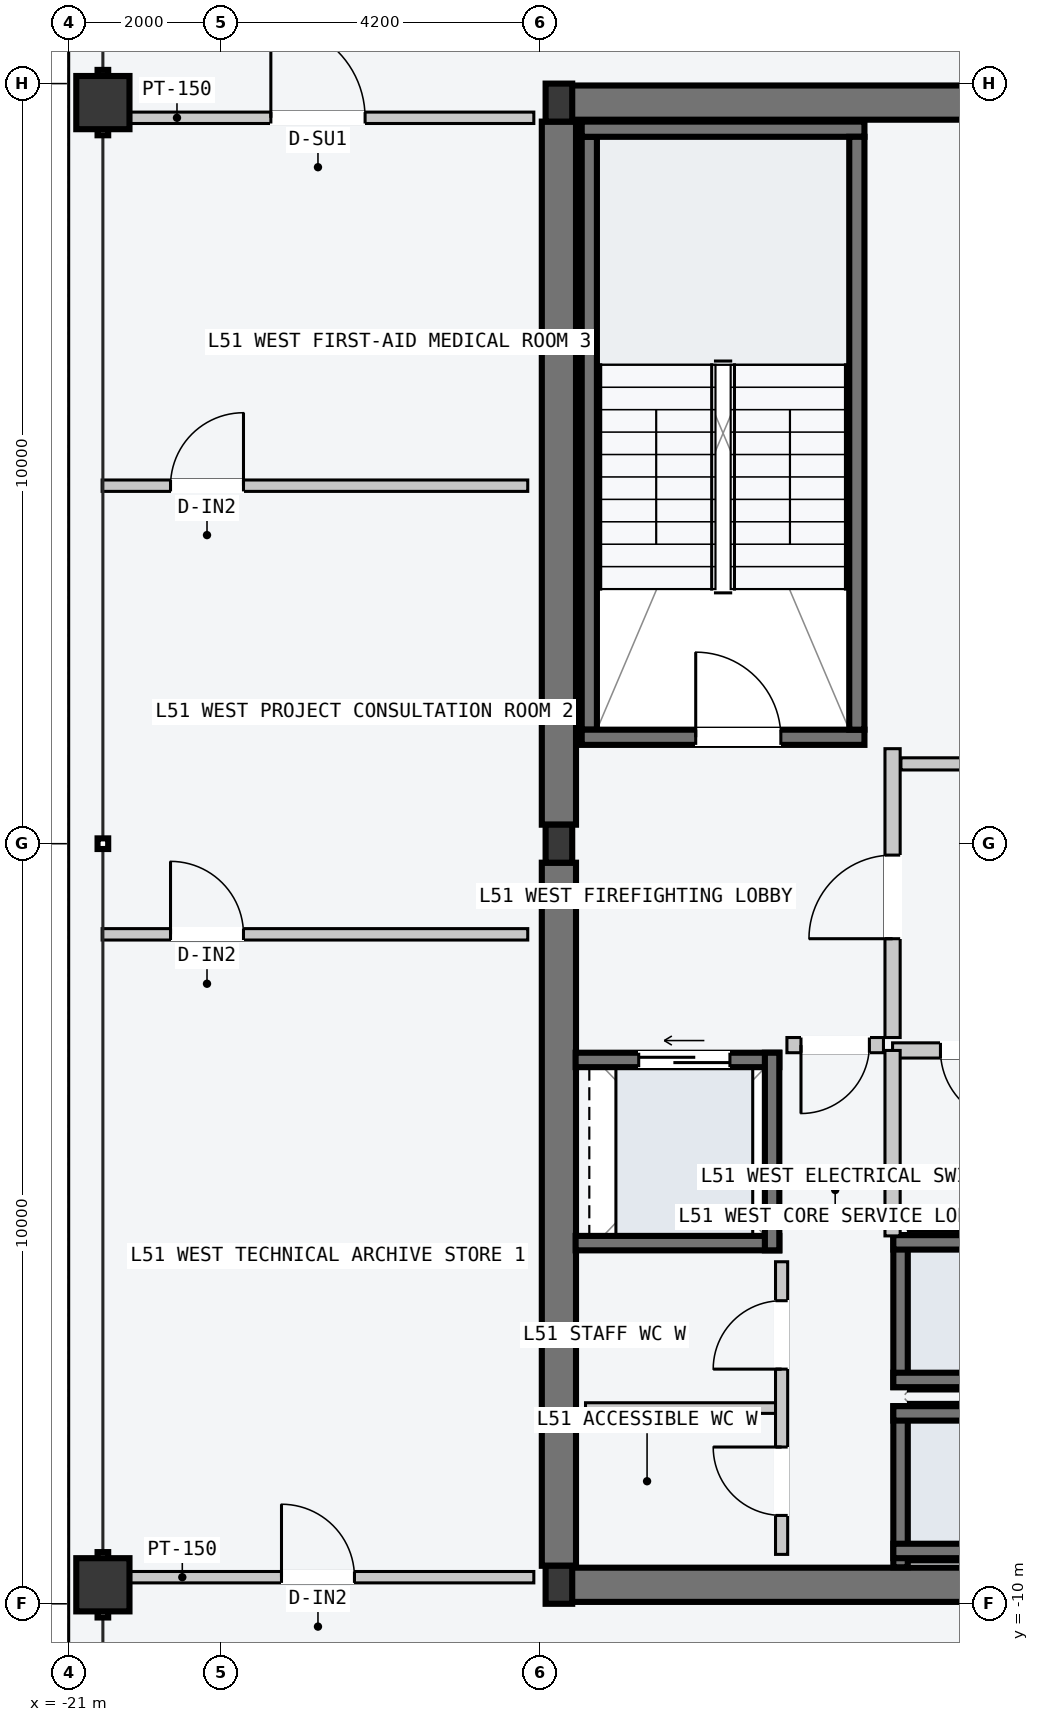
"""IFC4 building model, lengths in metres.
Left out: names, types, materials, properties, quantities, classifications, styles, units other than length and angle.
Written with IfcOpenShell. Run it as: python <this file> out.ifc"""

import sys

from ifc_helpers import new_model, si_unit, direction, frame, frame_2d, origin, origin_2d, place, context, subcontext, project, spatial, rectangle, hollow_rectangle, i_section, extrude, element, fill, save


model = new_model("IFC4")
c1 = context("Model", 3, precision=1e-05, world=origin(), true_north=direction((0.0, 1.0)))
c2 = subcontext(c1, "Body", "Model", "MODEL_VIEW")
j1 = project(units=[si_unit("LENGTHUNIT", "METRE"), si_unit("PLANEANGLEUNIT", "RADIAN")], contexts=[c1])
p1 = place(None, origin())
s1 = spatial("IfcSite", under=j1, at=p1, CompositionType="ELEMENT")
p2 = place(p1, origin())
s2 = spatial("IfcBuilding", under=s1, at=p2, CompositionType="ELEMENT")
p3 = place(p2, frame((0.0, 0.0, 194.7)))
s3 = spatial("IfcBuildingStorey", under=s2, at=p3, CompositionType="ELEMENT", Elevation=194.7)
for number, where, z_axis, x_axis in (
    (1, (-14.53, -9.75, -0.2), (0.0, 0.0, 1.0), (1.0, 0.0, 0.0)),
    (2, (-14.53, 9.75, -0.2), (0.0, 0.0, 1.0), (1.0, 0.0, 0.0)),
):
    element("IfcWall", number, at=place(p3, frame(where, z_axis=z_axis, x_axis=x_axis)), inside=s3, PredefinedType="SHEAR", context=c2, shape_type="SweptSolid", body=[
        extrude(rectangle(XDim=6.46, YDim=0.45, at=frame_2d((3.23, 0.0))), origin(), (0.0, 0.0, 1.0), 3.6),
    ])
for number, where, z_axis, x_axis in (
    (3, (-14.55, -9.5, -0.2), (0.0, 0.0, 1.0), (0.0, 1.0, 0.0)),
    (4, (-14.55, 0.25, -0.2), (0.0, 0.0, 1.0), (0.0, 1.0, 0.0)),
):
    element("IfcWall", number, at=place(p3, frame(where, z_axis=z_axis, x_axis=x_axis)), inside=s3, PredefinedType="SHEAR", context=c2, shape_type="SweptSolid", body=[
        extrude(rectangle(XDim=9.25, YDim=0.45, at=frame_2d((4.625, 0.0))), origin(), (0.0, 0.0, 1.0), 3.6),
    ])
p4 = place(p3, frame((-14.15, 1.5, -0.2), z_axis=(0.0, 0.0, 1.0), x_axis=(0.0, 1.0, 0.0)))
e5 = element("IfcWall", 5, at=p4, inside=s3, PredefinedType="SOLIDWALL", context=c2, shape_type="SweptSolid", body=[
    extrude(rectangle(XDim=7.8, YDim=0.2, at=frame_2d((3.9, 0.0))), origin(), (0.0, 0.0, 1.0), 3.6),
])
p5 = place(p3, frame((-14.25, 1.4, -0.2), z_axis=(0.0, 0.0, 1.0), x_axis=(1.0, 0.0, 0.0)))
e6 = element("IfcWall", 6, at=p5, inside=s3, PredefinedType="SOLIDWALL", context=c2, shape_type="SweptSolid", body=[
    extrude(rectangle(XDim=3.72, YDim=0.2, at=frame_2d((1.86, 0.0))), origin(), (0.0, 0.0, 1.0), 3.6),
])
p6 = place(p5, frame((1.5, 0.0, 0.2)))
e7 = element("IfcOpeningElement", 7, at=p6, cuts=e6, PredefinedType="OPENING", context=c2, shape_type="SweptSolid", body=[
    extrude(rectangle(XDim=1.12, YDim=2.18, at=frame_2d((0.56, 1.09))), frame((0.0, 0.11, 0.0), z_axis=(0.0, -1.0, 0.0), x_axis=(1.0, 0.0, 0.0)), (0.0, 0.0, 1.0), 0.22),
])
p7 = place(p3, frame((-14.25, 9.4, -0.2), z_axis=(0.0, 0.0, 1.0), x_axis=(1.0, 0.0, 0.0)))
e8 = element("IfcWall", 8, at=p7, inside=s3, PredefinedType="SOLIDWALL", context=c2, shape_type="SweptSolid", body=[
    extrude(rectangle(XDim=3.72, YDim=0.2, at=frame_2d((1.86, 0.0))), origin(), (0.0, 0.0, 1.0), 3.6),
])
p8 = place(p3, frame((-10.63, 1.5, -0.2), z_axis=(0.0, 0.0, 1.0), x_axis=(0.0, 1.0, 0.0)))
e9 = element("IfcWall", 9, at=p8, inside=s3, PredefinedType="SOLIDWALL", context=c2, shape_type="SweptSolid", body=[
    extrude(rectangle(XDim=7.8, YDim=0.2, at=frame_2d((3.9, 0.0))), origin(), (0.0, 0.0, 1.0), 3.6),
])
for number, where, z_axis, x_axis in (
    (10, (-14.55, -9.75, 0.0), (0.0, 0.0, 1.0), (1.0, 0.0, 0.0)),
    (11, (-14.55, 0.0, 0.0), (0.0, 0.0, 1.0), (1.0, 0.0, 0.0)),
    (12, (-14.55, 9.75, 0.0), (0.0, 0.0, 1.0), (1.0, 0.0, 0.0)),
):
    element("IfcColumn", number, at=place(p3, frame(where, z_axis=z_axis, x_axis=x_axis)), inside=s3, PredefinedType="COLUMN", context=c2, shape_type="SweptSolid", body=[
        extrude(i_section(OverallWidth=0.35, OverallDepth=0.5, WebThickness=0.02, FlangeThickness=0.032, at=origin_2d()), origin(), (0.0, 0.0, 1.0), 3.6),
    ])
for number, where, z_axis, x_axis in (
    (13, (-20.55, -9.75, 0.0), (0.0, 0.0, 1.0), (0.0, 1.0, 0.0)),
    (14, (-20.55, 9.75, 0.0), (0.0, 0.0, 1.0), (0.0, 1.0, 0.0)),
):
    element("IfcColumn", number, at=place(p3, frame(where, z_axis=z_axis, x_axis=x_axis)), inside=s3, PredefinedType="COLUMN", context=c2, shape_type="SweptSolid", body=[
        extrude(hollow_rectangle(XDim=0.7, YDim=0.7, WallThickness=0.03, at=origin_2d()), origin(), (0.0, 0.0, 1.0), 3.6),
    ])
p9 = place(p3, frame((-10.055, -9.52, -0.2), z_axis=(0.0, 0.0, 1.0), x_axis=(0.0, 1.0, 0.0)))
e15 = element("IfcWall", 15, at=p9, inside=s3, PredefinedType="SOLIDWALL", context=c2, shape_type="SweptSolid", body=[
    extrude(rectangle(XDim=2.12, YDim=0.19, at=frame_2d((1.06, 0.0))), origin(), (0.0, 0.0, 1.0), 3.6),
])
for number, where, z_axis, x_axis in (
    (16, (-10.15, -7.495, -0.2), (0.0, 0.0, 1.0), (1.0, 0.0, 0.0)),
    (17, (-10.15, -9.305, -0.2), (0.0, 0.0, 1.0), (1.0, 0.0, 0.0)),
):
    element("IfcWall", number, at=place(p3, frame(where, z_axis=z_axis, x_axis=x_axis)), inside=s3, PredefinedType="SOLIDWALL", context=c2, shape_type="SweptSolid", body=[
        extrude(rectangle(XDim=2.2, YDim=0.19, at=frame_2d((1.1, 0.0))), origin(), (0.0, 0.0, 1.0), 3.6),
    ])
p10 = place(p3, frame((-10.055, -7.15, -0.2), z_axis=(0.0, 0.0, 1.0), x_axis=(0.0, 1.0, 0.0)))
e18 = element("IfcWall", 18, at=p10, inside=s3, PredefinedType="SOLIDWALL", context=c2, shape_type="SweptSolid", body=[
    extrude(rectangle(XDim=2.0, YDim=0.19, at=frame_2d((1.0, 0.0))), origin(), (0.0, 0.0, 1.0), 3.6),
])
for number, where, z_axis, x_axis in (
    (19, (-10.15, -5.245, -0.2), (0.0, 0.0, 1.0), (1.0, 0.0, 0.0)),
    (20, (-10.15, -7.055, -0.2), (0.0, 0.0, 1.0), (1.0, 0.0, 0.0)),
):
    element("IfcWall", number, at=place(p3, frame(where, z_axis=z_axis, x_axis=x_axis)), inside=s3, PredefinedType="SOLIDWALL", context=c2, shape_type="SweptSolid", body=[
        extrude(rectangle(XDim=2.2, YDim=0.19, at=frame_2d((1.1, 0.0))), origin(), (0.0, 0.0, 1.0), 3.6),
    ])
p11 = place(p3, frame((-14.33, -2.845, -0.2), z_axis=(0.0, 0.0, 1.0), x_axis=(1.0, 0.0, 0.0)))
e21 = element("IfcWall", 21, at=p11, inside=s3, PredefinedType="SOLIDWALL", context=c2, shape_type="SweptSolid", body=[
    extrude(rectangle(XDim=2.68, YDim=0.19, at=frame_2d((1.34, 0.0))), origin(), (0.0, 0.0, 1.0), 3.6),
])
p12 = place(p11, frame((0.83, 0.0, 0.2)))
e22 = element("IfcOpeningElement", 22, at=p12, cuts=e21, PredefinedType="OPENING", context=c2, shape_type="SweptSolid", body=[
    extrude(rectangle(XDim=1.2, YDim=2.2, at=frame_2d((0.6, 1.1))), frame((0.0, 0.105, 0.0), z_axis=(0.0, -1.0, 0.0), x_axis=(1.0, 0.0, 0.0)), (0.0, 0.0, 1.0), 0.21),
])
p13 = place(p3, frame((-14.33, -5.255, -0.2), z_axis=(0.0, 0.0, 1.0), x_axis=(1.0, 0.0, 0.0)))
e23 = element("IfcWall", 23, at=p13, inside=s3, PredefinedType="SOLIDWALL", context=c2, shape_type="SweptSolid", body=[
    extrude(rectangle(XDim=2.68, YDim=0.19, at=frame_2d((1.34, 0.0))), origin(), (0.0, 0.0, 1.0), 3.6),
])
p14 = place(p3, frame((-11.745, -5.35, -0.2), z_axis=(0.0, 0.0, 1.0), x_axis=(0.0, 1.0, 0.0)))
e24 = element("IfcWall", 24, at=p14, inside=s3, PredefinedType="SOLIDWALL", context=c2, shape_type="SweptSolid", body=[
    extrude(rectangle(XDim=2.6, YDim=0.19, at=frame_2d((1.3, 0.0))), origin(), (0.0, 0.0, 1.0), 3.6),
])
p15 = place(p3, frame((-10.16, -2.55, 0.0), z_axis=(0.0, 0.0, 1.0), x_axis=(0.0, 1.0, 0.0)))
e25 = element("IfcWall", 25, at=p15, inside=s3, PredefinedType="PARTITIONING", context=c2, shape_type="SweptSolid", body=[
    extrude(rectangle(XDim=3.8, YDim=0.2, at=frame_2d((1.9, 0.0))), origin(), (0.0, 0.0, 1.0), 3.4),
])
p16 = place(p15, frame((1.3, 0.0, 0.0)))
e26 = element("IfcOpeningElement", 26, at=p16, cuts=e25, PredefinedType="OPENING", context=c2, shape_type="SweptSolid", body=[
    extrude(rectangle(XDim=1.1, YDim=2.15, at=frame_2d((0.55, 1.075))), frame((0.0, 0.11, 0.0), z_axis=(0.0, -1.0, 0.0), x_axis=(1.0, 0.0, 0.0)), (0.0, 0.0, 1.0), 0.22),
])
p17 = place(p3, frame((-10.28, -2.65, 0.0), z_axis=(0.0, 0.0, 1.0), x_axis=(-1.0, 0.0, 0.0)))
e27 = element("IfcWall", 27, at=p17, inside=s3, PredefinedType="PARTITIONING", context=c2, shape_type="SweptSolid", body=[
    extrude(rectangle(XDim=1.27, YDim=0.2, at=frame_2d((0.635, 0.0))), origin(), (0.0, 0.0, 1.0), 3.4),
])
p18 = place(p17, frame((0.185, 0.0, 0.0)))
e28 = element("IfcOpeningElement", 28, at=p18, cuts=e27, PredefinedType="OPENING", context=c2, shape_type="SweptSolid", body=[
    extrude(rectangle(XDim=0.9, YDim=2.15, at=frame_2d((0.45, 1.075))), frame((0.0, 0.11, 0.0), z_axis=(0.0, -1.0, 0.0), x_axis=(1.0, 0.0, 0.0)), (0.0, 0.0, 1.0), 0.22),
])
p19 = place(p3, frame((-7.96, -2.72, 0.0), z_axis=(0.0, 0.0, 1.0), x_axis=(-1.0, 0.0, 0.0)))
e29 = element("IfcWall", 29, at=p19, inside=s3, PredefinedType="PARTITIONING", context=c2, shape_type="SweptSolid", body=[
    extrude(rectangle(XDim=2.2, YDim=0.2, at=frame_2d((1.1, 0.0))), origin(), (0.0, 0.0, 1.0), 3.4),
])
p20 = place(p19, frame((0.62, 0.0, 0.0)))
e30 = element("IfcOpeningElement", 30, at=p20, cuts=e29, PredefinedType="OPENING", context=c2, shape_type="SweptSolid", body=[
    extrude(rectangle(XDim=0.95, YDim=2.1, at=frame_2d((0.475, 1.05))), frame((0.0, 0.11, 0.0), z_axis=(0.0, -1.0, 0.0), x_axis=(1.0, 0.0, 0.0)), (0.0, 0.0, 1.0), 0.22),
])
p21 = place(p3, frame((-10.16, -5.16, 0.0), z_axis=(0.0, 0.0, 1.0), x_axis=(0.0, 1.0, 0.0)))
e31 = element("IfcWall", 31, at=p21, inside=s3, PredefinedType="PARTITIONING", context=c2, shape_type="SweptSolid", body=[
    extrude(rectangle(XDim=2.44, YDim=0.2, at=frame_2d((1.22, 0.0))), origin(), (0.0, 0.0, 1.0), 3.4),
])
p22 = place(p3, frame((-11.7, -7.425, 0.0), z_axis=(0.0, 0.0, 1.0), x_axis=(-1.0, 0.0, 0.0)))
e32 = element("IfcWall", 32, at=p22, inside=s3, PredefinedType="PARTITIONING", context=c2, shape_type="SweptSolid", body=[
    extrude(rectangle(XDim=2.5, YDim=0.14, at=frame_2d((1.25, 0.0))), origin(), (0.0, 0.0, 1.0), 3.4),
])
p23 = place(p3, frame((-11.62, -9.35, 0.0), z_axis=(0.0, 0.0, 1.0), x_axis=(0.0, 1.0, 0.0)))
e33 = element("IfcWall", 33, at=p23, inside=s3, PredefinedType="PARTITIONING", context=c2, shape_type="SweptSolid", body=[
    extrude(rectangle(XDim=3.85, YDim=0.16, at=frame_2d((1.925, 0.0))), origin(), (0.0, 0.0, 1.0), 3.4),
])
p24 = place(p23, frame((0.512, 0.0, 0.0)))
e34 = element("IfcOpeningElement", 34, at=p24, cuts=e33, PredefinedType="OPENING", context=c2, shape_type="SweptSolid", body=[
    extrude(rectangle(XDim=0.9, YDim=2.15, at=frame_2d((0.45, 1.075))), frame((0.0, 0.09, 0.0), z_axis=(0.0, -1.0, 0.0), x_axis=(1.0, 0.0, 0.0)), (0.0, 0.0, 1.0), 0.18),
])
p25 = place(p23, frame((2.438, 0.0, 0.0)))
e35 = element("IfcOpeningElement", 35, at=p25, cuts=e33, PredefinedType="OPENING", context=c2, shape_type="SweptSolid", body=[
    extrude(rectangle(XDim=0.9, YDim=2.15, at=frame_2d((0.45, 1.075))), frame((0.0, 0.09, 0.0), z_axis=(0.0, -1.0, 0.0), x_axis=(1.0, 0.0, 0.0)), (0.0, 0.0, 1.0), 0.18),
])
p26 = place(p3, frame((-10.05, 1.05, 0.0), z_axis=(0.0, 0.0, 1.0), x_axis=(1.0, 0.0, 0.0)))
e36 = element("IfcWall", 36, at=p26, inside=s3, PredefinedType="PARTITIONING", context=c2, shape_type="SweptSolid", body=[
    extrude(rectangle(XDim=8.79, YDim=0.16, at=frame_2d((4.395, 0.0))), origin(), (0.0, 0.0, 1.0), 3.4),
])
p27 = place(p3, frame((-20.56, 9.55, 0.0), z_axis=(0.0, 0.0, 1.0), x_axis=(1.0, 0.0, 0.0)))
e37 = element("IfcWall", 37, at=p27, inside=s3, PredefinedType="PARTITIONING", context=c2, shape_type="SweptSolid", body=[
    extrude(rectangle(XDim=5.68, YDim=0.15, at=frame_2d((2.84, 0.0))), origin(), (0.0, 0.0, 1.0), 3.4),
])
p28 = place(p27, frame((2.22, 0.0, 0.0)))
e38 = element("IfcOpeningElement", 38, at=p28, cuts=e37, PredefinedType="OPENING", context=c2, shape_type="SweptSolid", body=[
    extrude(rectangle(XDim=1.24, YDim=2.24, at=frame_2d((0.62, 1.12))), frame((0.0, 0.085, 0.0), z_axis=(0.0, -1.0, 0.0), x_axis=(1.0, 0.0, 0.0)), (0.0, 0.0, 1.0), 0.17),
])
p29 = place(p3, frame((-20.56, -9.65, 0.0), z_axis=(0.0, 0.0, 1.0), x_axis=(1.0, 0.0, 0.0)))
e39 = element("IfcWall", 39, at=p29, inside=s3, PredefinedType="PARTITIONING", context=c2, shape_type="SweptSolid", body=[
    extrude(rectangle(XDim=5.68, YDim=0.15, at=frame_2d((2.84, 0.0))), origin(), (0.0, 0.0, 1.0), 2.75),
])
p30 = place(p29, frame((2.36, 0.0, 0.0)))
e40 = element("IfcOpeningElement", 40, at=p30, cuts=e39, PredefinedType="OPENING", context=c2, shape_type="SweptSolid", body=[
    extrude(rectangle(XDim=0.96, YDim=2.18, at=frame_2d((0.48, 1.09))), frame((0.0, 0.085, 0.0), z_axis=(0.0, -1.0, 0.0), x_axis=(1.0, 0.0, 0.0)), (0.0, 0.0, 1.0), 0.17),
])
p31 = place(p3, frame((-20.56, -1.192, 0.0), z_axis=(0.0, 0.0, 1.0), x_axis=(1.0, 0.0, 0.0)))
e41 = element("IfcWall", 41, at=p31, inside=s3, PredefinedType="PARTITIONING", context=c2, shape_type="SweptSolid", body=[
    extrude(rectangle(XDim=5.6, YDim=0.15, at=frame_2d((2.8, 0.0))), origin(), (0.0, 0.0, 1.0), 3.4),
])
p32 = place(p31, frame((0.9, 0.0, 0.0)))
e42 = element("IfcOpeningElement", 42, at=p32, cuts=e41, PredefinedType="OPENING", context=c2, shape_type="SweptSolid", body=[
    extrude(rectangle(XDim=0.96, YDim=2.18, at=frame_2d((0.48, 1.09))), frame((0.0, 0.085, 0.0), z_axis=(0.0, -1.0, 0.0), x_axis=(1.0, 0.0, 0.0)), (0.0, 0.0, 1.0), 0.17),
])
p33 = place(p3, frame((-20.56, 4.71, 0.0), z_axis=(0.0, 0.0, 1.0), x_axis=(1.0, 0.0, 0.0)))
e43 = element("IfcWall", 43, at=p33, inside=s3, PredefinedType="PARTITIONING", context=c2, shape_type="SweptSolid", body=[
    extrude(rectangle(XDim=5.6, YDim=0.15, at=frame_2d((2.8, 0.0))), origin(), (0.0, 0.0, 1.0), 3.4),
])
p34 = place(p33, frame((0.9, 0.0, 0.0)))
e44 = element("IfcOpeningElement", 44, at=p34, cuts=e43, PredefinedType="OPENING", context=c2, shape_type="SweptSolid", body=[
    extrude(rectangle(XDim=0.96, YDim=2.18, at=frame_2d((0.48, 1.09))), frame((0.0, 0.085, 0.0), z_axis=(0.0, -1.0, 0.0), x_axis=(1.0, 0.0, 0.0)), (0.0, 0.0, 1.0), 0.17),
])
p35 = place(p6, origin())
e45 = element("IfcDoor", 45, at=p35, inside=s3, OperationType="SINGLE_SWING_LEFT", PredefinedType="DOOR", context=c2, shape_type="SweptSolid", body=[
    extrude(rectangle(XDim=1.12, YDim=2.18, at=frame_2d((0.56, 1.09))), frame((0.0, 0.025, 0.0), z_axis=(0.0, -1.0, 0.0), x_axis=(1.0, 0.0, 0.0)), (0.0, 0.0, 1.0), 0.05),
])
fill(e7, e45)
p36 = place(p12, origin())
e46 = element("IfcDoor", 46, at=p36, inside=s3, OperationType="SLIDING_TO_LEFT", PredefinedType="DOOR", context=c2, shape_type="SweptSolid", body=[
    extrude(rectangle(XDim=1.2, YDim=2.2, at=frame_2d((0.6, 1.1))), frame((0.0, 0.025, 0.0), z_axis=(0.0, -1.0, 0.0), x_axis=(1.0, 0.0, 0.0)), (0.0, 0.0, 1.0), 0.05),
])
fill(e22, e46)
p37 = place(p16, origin())
e47 = element("IfcDoor", 47, at=p37, inside=s3, OperationType="SINGLE_SWING_LEFT", PredefinedType="DOOR", context=c2, shape_type="SweptSolid", body=[
    extrude(rectangle(XDim=1.1, YDim=2.15, at=frame_2d((0.55, 1.075))), frame((0.0, 0.025, 0.0), z_axis=(0.0, -1.0, 0.0), x_axis=(1.0, 0.0, 0.0)), (0.0, 0.0, 1.0), 0.05),
])
fill(e26, e47)
p38 = place(p18, origin())
e48 = element("IfcDoor", 48, at=p38, inside=s3, OperationType="SINGLE_SWING_RIGHT", PredefinedType="DOOR", context=c2, shape_type="SweptSolid", body=[
    extrude(rectangle(XDim=0.9, YDim=2.15, at=frame_2d((0.45, 1.075))), frame((0.0, 0.025, 0.0), z_axis=(0.0, -1.0, 0.0), x_axis=(1.0, 0.0, 0.0)), (0.0, 0.0, 1.0), 0.05),
])
fill(e28, e48)
p39 = place(p20, origin())
e49 = element("IfcDoor", 49, at=p39, inside=s3, OperationType="SINGLE_SWING_LEFT", PredefinedType="DOOR", context=c2, shape_type="SweptSolid", body=[
    extrude(rectangle(XDim=0.95, YDim=2.1, at=frame_2d((0.475, 1.05))), frame((0.0, 0.025, 0.0), z_axis=(0.0, -1.0, 0.0), x_axis=(1.0, 0.0, 0.0)), (0.0, 0.0, 1.0), 0.05),
])
fill(e30, e49)
p40 = place(p24, origin())
e50 = element("IfcDoor", 50, at=p40, inside=s3, OperationType="SINGLE_SWING_RIGHT", PredefinedType="DOOR", context=c2, shape_type="SweptSolid", body=[
    extrude(rectangle(XDim=0.9, YDim=2.15, at=frame_2d((0.45, 1.075))), frame((0.0, 0.025, 0.0), z_axis=(0.0, -1.0, 0.0), x_axis=(1.0, 0.0, 0.0)), (0.0, 0.0, 1.0), 0.05),
])
fill(e34, e50)
p41 = place(p25, origin())
e51 = element("IfcDoor", 51, at=p41, inside=s3, OperationType="SINGLE_SWING_LEFT", PredefinedType="DOOR", context=c2, shape_type="SweptSolid", body=[
    extrude(rectangle(XDim=0.9, YDim=2.15, at=frame_2d((0.45, 1.075))), frame((0.0, 0.025, 0.0), z_axis=(0.0, -1.0, 0.0), x_axis=(1.0, 0.0, 0.0)), (0.0, 0.0, 1.0), 0.05),
])
fill(e35, e51)
p42 = place(p28, origin())
e52 = element("IfcDoor", 52, at=p42, inside=s3, OperationType="SINGLE_SWING_LEFT", PredefinedType="DOOR", context=c2, shape_type="SweptSolid", body=[
    extrude(rectangle(XDim=1.24, YDim=2.24, at=frame_2d((0.62, 1.12))), frame((0.0, 0.025, 0.0), z_axis=(0.0, -1.0, 0.0), x_axis=(1.0, 0.0, 0.0)), (0.0, 0.0, 1.0), 0.05),
])
fill(e38, e52)
p43 = place(p30, origin())
e53 = element("IfcDoor", 53, at=p43, inside=s3, OperationType="SINGLE_SWING_LEFT", PredefinedType="DOOR", context=c2, shape_type="SweptSolid", body=[
    extrude(rectangle(XDim=0.96, YDim=2.18, at=frame_2d((0.48, 1.09))), frame((0.0, 0.025, 0.0), z_axis=(0.0, -1.0, 0.0), x_axis=(1.0, 0.0, 0.0)), (0.0, 0.0, 1.0), 0.05),
])
fill(e40, e53)
p44 = place(p32, origin())
e54 = element("IfcDoor", 54, at=p44, inside=s3, OperationType="SINGLE_SWING_LEFT", PredefinedType="DOOR", context=c2, shape_type="SweptSolid", body=[
    extrude(rectangle(XDim=0.96, YDim=2.18, at=frame_2d((0.48, 1.09))), frame((0.0, 0.025, 0.0), z_axis=(0.0, -1.0, 0.0), x_axis=(1.0, 0.0, 0.0)), (0.0, 0.0, 1.0), 0.05),
])
fill(e42, e54)
p45 = place(p34, origin())
e55 = element("IfcDoor", 55, at=p45, inside=s3, OperationType="SINGLE_SWING_RIGHT", PredefinedType="DOOR", context=c2, shape_type="SweptSolid", body=[
    extrude(rectangle(XDim=0.96, YDim=2.18, at=frame_2d((0.48, 1.09))), frame((0.0, 0.025, 0.0), z_axis=(0.0, -1.0, 0.0), x_axis=(1.0, 0.0, 0.0)), (0.0, 0.0, 1.0), 0.05),
])
fill(e44, e55)
save(model, sys.argv[1])
